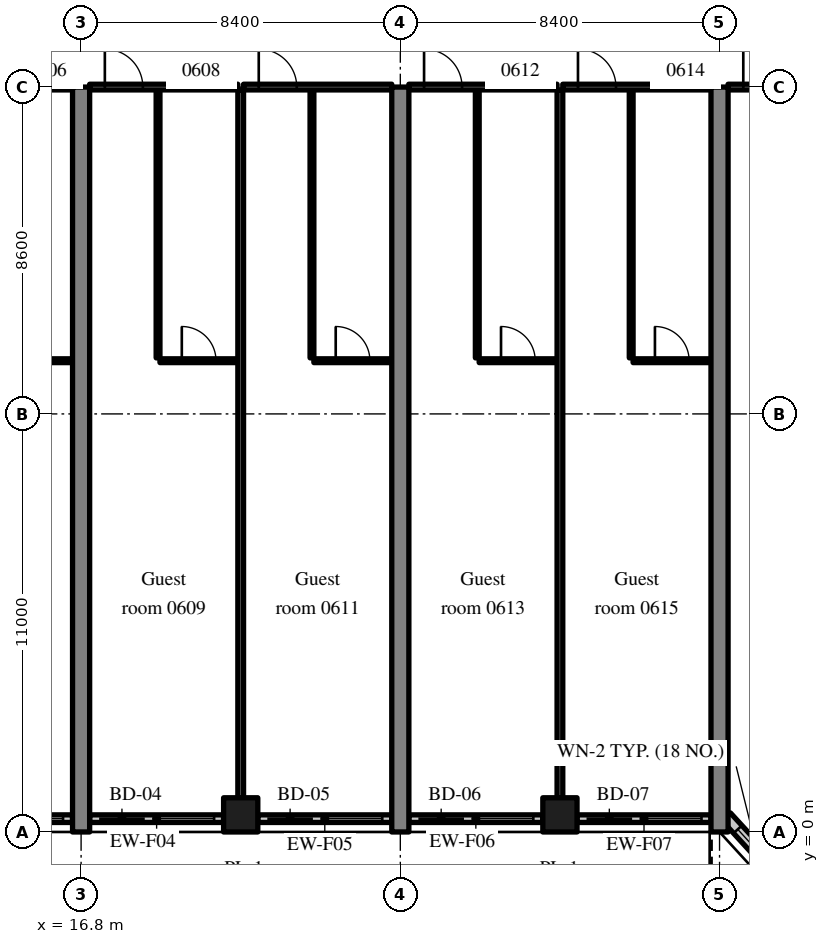
"""IFC4 building model, lengths in metres.
Left out: names, types, materials, properties, quantities, classifications, styles, units other than length and angle.
Written with IfcOpenShell. Run it as: python <this file> out.ifc"""

import sys

from ifc_helpers import new_model, si_unit, direction, frame, frame_2d, origin, origin_2d, place, context, subcontext, project, spatial, rectangle, extrude, source, transform, mapped, element, fill, save


model = new_model("IFC4")
c1 = context("Model", 3, precision=1e-05, world=origin(), true_north=direction((0.0, 1.0)))
c2 = subcontext(c1, "Body", "Model", "MODEL_VIEW")
j1 = project(units=[si_unit("LENGTHUNIT", "METRE"), si_unit("PLANEANGLEUNIT", "RADIAN")], contexts=[c1])
p1 = place(None, origin())
s1 = spatial("IfcSite", under=j1, at=p1, CompositionType="ELEMENT")
p2 = place(p1, origin())
s2 = spatial("IfcBuilding", under=s1, at=p2, CompositionType="ELEMENT")
p3 = place(p2, frame((0.0, 0.0, 31.6)))
s3 = spatial("IfcBuildingStorey", under=s2, at=p3, CompositionType="ELEMENT", Elevation=31.6)
m1 = source(origin(), c2, "Body", "SweptSolid", [
    extrude(rectangle(XDim=19.6, YDim=0.45, at=frame_2d((9.8, 0.0))), origin(), (0.0, 0.0, 1.0), 3.52),
])
for number, where, z_axis, x_axis in (
    (1, (16.8, 0.0, 0.0), (0.0, 0.0, 1.0), (0.0, 1.0, 0.0)),
    (2, (25.2, 0.0, 0.0), (0.0, 0.0, 1.0), (0.0, 1.0, 0.0)),
    (3, (33.6, 0.0, 0.0), (0.0, 0.0, 1.0), (0.0, 1.0, 0.0)),
):
    element("IfcWall", number, at=place(p3, frame(where, z_axis=z_axis, x_axis=x_axis)), inside=s3, PredefinedType="SHEAR", context=c2, shape_type="MappedRepresentation", body=[
        mapped(m1, transform((0.0, 0.0, 0.0), scale=1.0)),
    ])
m2 = source(origin(), c2, "Body", "SweptSolid", [
    extrude(rectangle(XDim=0.9, YDim=0.9, at=origin_2d()), origin(), (0.0, 0.0, 1.0), 3.52),
])
for number, where, z_axis, x_axis in (
    (4, (21.0, 0.45, 0.0), (0.0, 0.0, 1.0), (1.0, 0.0, 0.0)),
    (5, (29.4, 0.45, 0.0), (0.0, 0.0, 1.0), (1.0, 0.0, 0.0)),
):
    element("IfcColumn", number, at=place(p3, frame(where, z_axis=z_axis, x_axis=x_axis)), inside=s3, PredefinedType="COLUMN", context=c2, shape_type="MappedRepresentation", body=[
        mapped(m2, transform((0.0, 0.0, 0.0), scale=1.0)),
    ])
m3 = source(origin(), c2, "Body", "SweptSolid", [
    extrude(rectangle(XDim=3.525, YDim=0.2, at=frame_2d((1.762, 0.0))), origin(), (0.0, 0.0, 1.0), 2.77),
])
p4 = place(p3, frame((13.05, 0.35, 0.0), z_axis=(0.0, 0.0, 1.0), x_axis=(1.0, 0.0, 0.0)))
e6 = element("IfcWall", 6, at=p4, inside=s3, PredefinedType="SOLIDWALL", context=c2, shape_type="MappedRepresentation", body=[
    mapped(m3, transform((0.0, 0.0, 0.0), scale=1.0)),
])
m4 = source(origin(), c2, "Body", "SweptSolid", [
    extrude(rectangle(XDim=1.2, YDim=2.4, at=frame_2d((0.6, 1.2))), frame((0.0, 0.11, 0.0), z_axis=(0.0, -1.0, 0.0), x_axis=(1.0, 0.0, 0.0)), (0.0, 0.0, 1.0), 0.22),
])
p5 = place(p4, frame((0.25, 0.0, 0.0)))
e7 = element("IfcOpeningElement", 7, at=p5, cuts=e6, PredefinedType="OPENING", context=c2, shape_type="MappedRepresentation", body=[
    mapped(m4, transform((0.0, 0.0, 0.0), scale=1.0)),
])
m5 = source(origin(), c2, "Body", "SweptSolid", [
    extrude(rectangle(XDim=1.5, YDim=1.5, at=frame_2d((0.75, 0.75))), frame((0.0, 0.11, 0.0), z_axis=(0.0, -1.0, 0.0), x_axis=(1.0, 0.0, 0.0)), (0.0, 0.0, 1.0), 0.22),
])
p6 = place(p4, frame((1.775, 0.0, 0.9)))
e8 = element("IfcOpeningElement", 8, at=p6, cuts=e6, PredefinedType="OPENING", context=c2, shape_type="MappedRepresentation", body=[
    mapped(m5, transform((0.0, 0.0, 0.0), scale=1.0)),
])
m6 = source(origin(), c2, "Body", "SweptSolid", [
    extrude(rectangle(XDim=3.525, YDim=0.2, at=frame_2d((1.763, 0.0))), origin(), (0.0, 0.0, 1.0), 2.77),
])
p7 = place(p3, frame((17.025, 0.35, 0.0), z_axis=(0.0, 0.0, 1.0), x_axis=(1.0, 0.0, 0.0)))
e9 = element("IfcWall", 9, at=p7, inside=s3, PredefinedType="SOLIDWALL", context=c2, shape_type="MappedRepresentation", body=[
    mapped(m6, transform((0.0, 0.0, 0.0), scale=1.0)),
])
p8 = place(p7, frame((0.25, 0.0, 0.0)))
e10 = element("IfcOpeningElement", 10, at=p8, cuts=e9, PredefinedType="OPENING", context=c2, shape_type="MappedRepresentation", body=[
    mapped(m4, transform((0.0, 0.0, 0.0), scale=1.0)),
])
p9 = place(p7, frame((1.775, 0.0, 0.9)))
e11 = element("IfcOpeningElement", 11, at=p9, cuts=e9, PredefinedType="OPENING", context=c2, shape_type="MappedRepresentation", body=[
    mapped(m5, transform((0.0, 0.0, 0.0), scale=1.0)),
])
p10 = place(p3, frame((21.45, 0.35, 0.0), z_axis=(0.0, 0.0, 1.0), x_axis=(1.0, 0.0, 0.0)))
e12 = element("IfcWall", 12, at=p10, inside=s3, PredefinedType="SOLIDWALL", context=c2, shape_type="MappedRepresentation", body=[
    mapped(m6, transform((0.0, 0.0, 0.0), scale=1.0)),
])
p11 = place(p10, frame((0.25, 0.0, 0.0)))
e13 = element("IfcOpeningElement", 13, at=p11, cuts=e12, PredefinedType="OPENING", context=c2, shape_type="MappedRepresentation", body=[
    mapped(m4, transform((0.0, 0.0, 0.0), scale=1.0)),
])
p12 = place(p10, frame((1.775, 0.0, 0.9)))
e14 = element("IfcOpeningElement", 14, at=p12, cuts=e12, PredefinedType="OPENING", context=c2, shape_type="MappedRepresentation", body=[
    mapped(m5, transform((0.0, 0.0, 0.0), scale=1.0)),
])
p13 = place(p3, frame((25.425, 0.35, 0.0), z_axis=(0.0, 0.0, 1.0), x_axis=(1.0, 0.0, 0.0)))
e15 = element("IfcWall", 15, at=p13, inside=s3, PredefinedType="SOLIDWALL", context=c2, shape_type="MappedRepresentation", body=[
    mapped(m3, transform((0.0, 0.0, 0.0), scale=1.0)),
])
p14 = place(p13, frame((0.25, 0.0, 0.0)))
e16 = element("IfcOpeningElement", 16, at=p14, cuts=e15, PredefinedType="OPENING", context=c2, shape_type="MappedRepresentation", body=[
    mapped(m4, transform((0.0, 0.0, 0.0), scale=1.0)),
])
p15 = place(p13, frame((1.775, 0.0, 0.9)))
e17 = element("IfcOpeningElement", 17, at=p15, cuts=e15, PredefinedType="OPENING", context=c2, shape_type="MappedRepresentation", body=[
    mapped(m5, transform((0.0, 0.0, 0.0), scale=1.0)),
])
p16 = place(p3, frame((29.85, 0.35, 0.0), z_axis=(0.0, 0.0, 1.0), x_axis=(1.0, 0.0, 0.0)))
e18 = element("IfcWall", 18, at=p16, inside=s3, PredefinedType="SOLIDWALL", context=c2, shape_type="MappedRepresentation", body=[
    mapped(m3, transform((0.0, 0.0, 0.0), scale=1.0)),
])
p17 = place(p16, frame((0.25, 0.0, 0.0)))
e19 = element("IfcOpeningElement", 19, at=p17, cuts=e18, PredefinedType="OPENING", context=c2, shape_type="MappedRepresentation", body=[
    mapped(m4, transform((0.0, 0.0, 0.0), scale=1.0)),
])
p18 = place(p16, frame((1.775, 0.0, 0.9)))
e20 = element("IfcOpeningElement", 20, at=p18, cuts=e18, PredefinedType="OPENING", context=c2, shape_type="MappedRepresentation", body=[
    mapped(m5, transform((0.0, 0.0, 0.0), scale=1.0)),
])
m7 = source(origin(), c2, "Body", "SweptSolid", [
    extrude(rectangle(XDim=2.398, YDim=0.3, at=frame_2d((1.199, 0.0))), origin(), (0.0, 0.0, 1.0), 3.52),
])
p19 = place(p3, frame((33.776, 0.4, 0.0), z_axis=(0.0, 0.0, 1.0), x_axis=(0.675374189419, -0.737475222815, 0.0)))
e21 = element("IfcWall", 21, at=p19, inside=s3, PredefinedType="SOLIDWALL", context=c2, shape_type="MappedRepresentation", body=[
    mapped(m7, transform((0.0, 0.0, 0.0), scale=1.0)),
])
m8 = source(origin(), c2, "Body", "SweptSolid", [
    extrude(rectangle(XDim=1.5, YDim=2.0, at=frame_2d((0.75, 1.0))), frame((0.0, 0.16, 0.0), z_axis=(0.0, -1.0, 0.0), x_axis=(1.0, 0.0, 0.0)), (0.0, 0.0, 1.0), 0.32),
])
p20 = place(p19, frame((0.449, 0.0, 0.9)))
e22 = element("IfcOpeningElement", 22, at=p20, cuts=e21, PredefinedType="OPENING", context=c2, shape_type="MappedRepresentation", body=[
    mapped(m8, transform((0.0, 0.0, 0.0), scale=1.0)),
])
m9 = source(origin(), c2, "Body", "SweptSolid", [
    extrude(rectangle(XDim=2.05, YDim=0.1, at=frame_2d((1.025, 0.0))), origin(), (0.0, 0.0, 1.0), 3.52),
])
p21 = place(p3, frame((14.525, 12.4, 0.0), z_axis=(0.0, 0.0, 1.0), x_axis=(1.0, 0.0, 0.0)))
e23 = element("IfcWall", 23, at=p21, inside=s3, PredefinedType="PARTITIONING", context=c2, shape_type="MappedRepresentation", body=[
    mapped(m9, transform((0.0, 0.0, 0.0), scale=1.0)),
])
m10 = source(origin(), c2, "Body", "SweptSolid", [
    extrude(rectangle(XDim=0.9, YDim=2.1, at=frame_2d((0.45, 1.05))), frame((0.0, 0.06, 0.0), z_axis=(0.0, -1.0, 0.0), x_axis=(1.0, 0.0, 0.0)), (0.0, 0.0, 1.0), 0.12),
])
p22 = place(p21, frame((0.575, 0.0, 0.0)))
e24 = element("IfcOpeningElement", 24, at=p22, cuts=e23, PredefinedType="OPENING", context=c2, shape_type="MappedRepresentation", body=[
    mapped(m10, transform((0.0, 0.0, 0.0), scale=1.0)),
])
m11 = source(origin(), c2, "Body", "SweptSolid", [
    extrude(rectangle(XDim=3.9, YDim=0.15, at=frame_2d((1.95, 0.0))), origin(), (0.0, 0.0, 1.0), 2.82),
])
p23 = place(p3, frame((12.675, 19.6, 0.0), z_axis=(0.0, 0.0, 1.0), x_axis=(1.0, 0.0, 0.0)))
e25 = element("IfcWall", 25, at=p23, inside=s3, PredefinedType="PARTITIONING", context=c2, shape_type="MappedRepresentation", body=[
    mapped(m11, transform((0.0, 0.0, 0.0), scale=1.0)),
])
m12 = source(origin(), c2, "Body", "SweptSolid", [
    extrude(rectangle(XDim=1.0, YDim=2.1, at=frame_2d((0.5, 1.05))), frame((0.0, 0.085, 0.0), z_axis=(0.0, -1.0, 0.0), x_axis=(1.0, 0.0, 0.0)), (0.0, 0.0, 1.0), 0.17),
])
p24 = place(p23, frame((0.4, 0.0, 0.0)))
e26 = element("IfcOpeningElement", 26, at=p24, cuts=e25, PredefinedType="OPENING", context=c2, shape_type="MappedRepresentation", body=[
    mapped(m12, transform((0.0, 0.0, 0.0), scale=1.0)),
])
m13 = source(origin(), c2, "Body", "SweptSolid", [
    extrude(rectangle(XDim=7.05, YDim=0.1, at=frame_2d((3.525, 0.0))), origin(), (0.0, 0.0, 1.0), 3.52),
])
p25 = place(p3, frame((18.825, 12.475, 0.0), z_axis=(0.0, 0.0, 1.0), x_axis=(0.0, 1.0, 0.0)))
e27 = element("IfcWall", 27, at=p25, inside=s3, PredefinedType="PARTITIONING", context=c2, shape_type="MappedRepresentation", body=[
    mapped(m13, transform((0.0, 0.0, 0.0), scale=1.0)),
])
p26 = place(p3, frame((18.875, 12.4, 0.0), z_axis=(0.0, 0.0, 1.0), x_axis=(1.0, 0.0, 0.0)))
e28 = element("IfcWall", 28, at=p26, inside=s3, PredefinedType="PARTITIONING", context=c2, shape_type="MappedRepresentation", body=[
    mapped(m9, transform((0.0, 0.0, 0.0), scale=1.0)),
])
p27 = place(p26, frame((0.575, 0.0, 0.0)))
e29 = element("IfcOpeningElement", 29, at=p27, cuts=e28, PredefinedType="OPENING", context=c2, shape_type="MappedRepresentation", body=[
    mapped(m10, transform((0.0, 0.0, 0.0), scale=1.0)),
])
m14 = source(origin(), c2, "Body", "SweptSolid", [
    extrude(rectangle(XDim=3.9, YDim=0.15, at=frame_2d((1.95, 0.0))), origin(), (0.0, 0.0, 1.0), 2.82),
])
p28 = place(p3, frame((17.025, 19.6, 0.0), z_axis=(0.0, 0.0, 1.0), x_axis=(1.0, 0.0, 0.0)))
e30 = element("IfcWall", 30, at=p28, inside=s3, PredefinedType="PARTITIONING", context=c2, shape_type="MappedRepresentation", body=[
    mapped(m14, transform((0.0, 0.0, 0.0), scale=1.0)),
])
p29 = place(p28, frame((0.4, 0.0, 0.0)))
e31 = element("IfcOpeningElement", 31, at=p29, cuts=e30, PredefinedType="OPENING", context=c2, shape_type="MappedRepresentation", body=[
    mapped(m12, transform((0.0, 0.0, 0.0), scale=1.0)),
])
p30 = place(p3, frame((22.875, 12.475, 0.0), z_axis=(0.0, 0.0, 1.0), x_axis=(0.0, 1.0, 0.0)))
e32 = element("IfcWall", 32, at=p30, inside=s3, PredefinedType="PARTITIONING", context=c2, shape_type="MappedRepresentation", body=[
    mapped(m13, transform((0.0, 0.0, 0.0), scale=1.0)),
])
p31 = place(p3, frame((22.925, 12.4, 0.0), z_axis=(0.0, 0.0, 1.0), x_axis=(1.0, 0.0, 0.0)))
e33 = element("IfcWall", 33, at=p31, inside=s3, PredefinedType="PARTITIONING", context=c2, shape_type="MappedRepresentation", body=[
    mapped(m9, transform((0.0, 0.0, 0.0), scale=1.0)),
])
p32 = place(p31, frame((0.575, 0.0, 0.0)))
e34 = element("IfcOpeningElement", 34, at=p32, cuts=e33, PredefinedType="OPENING", context=c2, shape_type="MappedRepresentation", body=[
    mapped(m10, transform((0.0, 0.0, 0.0), scale=1.0)),
])
p33 = place(p3, frame((21.075, 19.6, 0.0), z_axis=(0.0, 0.0, 1.0), x_axis=(1.0, 0.0, 0.0)))
e35 = element("IfcWall", 35, at=p33, inside=s3, PredefinedType="PARTITIONING", context=c2, shape_type="MappedRepresentation", body=[
    mapped(m14, transform((0.0, 0.0, 0.0), scale=1.0)),
])
p34 = place(p33, frame((0.4, 0.0, 0.0)))
e36 = element("IfcOpeningElement", 36, at=p34, cuts=e35, PredefinedType="OPENING", context=c2, shape_type="MappedRepresentation", body=[
    mapped(m12, transform((0.0, 0.0, 0.0), scale=1.0)),
])
m15 = source(origin(), c2, "Body", "SweptSolid", [
    extrude(rectangle(XDim=18.625, YDim=0.15, at=frame_2d((9.312, 0.0))), origin(), (0.0, 0.0, 1.0), 3.52),
])
p35 = place(p3, frame((21.0, 0.9, 0.0), z_axis=(0.0, 0.0, 1.0), x_axis=(0.0, 1.0, 0.0)))
e37 = element("IfcWall", 37, at=p35, inside=s3, PredefinedType="PARTITIONING", context=c2, shape_type="MappedRepresentation", body=[
    mapped(m15, transform((0.0, 0.0, 0.0), scale=1.0)),
])
p36 = place(p3, frame((27.225, 12.475, 0.0), z_axis=(0.0, 0.0, 1.0), x_axis=(0.0, 1.0, 0.0)))
e38 = element("IfcWall", 38, at=p36, inside=s3, PredefinedType="PARTITIONING", context=c2, shape_type="MappedRepresentation", body=[
    mapped(m13, transform((0.0, 0.0, 0.0), scale=1.0)),
])
p37 = place(p3, frame((27.275, 12.4, 0.0), z_axis=(0.0, 0.0, 1.0), x_axis=(1.0, 0.0, 0.0)))
e39 = element("IfcWall", 39, at=p37, inside=s3, PredefinedType="PARTITIONING", context=c2, shape_type="MappedRepresentation", body=[
    mapped(m9, transform((0.0, 0.0, 0.0), scale=1.0)),
])
p38 = place(p37, frame((0.575, 0.0, 0.0)))
e40 = element("IfcOpeningElement", 40, at=p38, cuts=e39, PredefinedType="OPENING", context=c2, shape_type="MappedRepresentation", body=[
    mapped(m10, transform((0.0, 0.0, 0.0), scale=1.0)),
])
p39 = place(p3, frame((25.425, 19.6, 0.0), z_axis=(0.0, 0.0, 1.0), x_axis=(1.0, 0.0, 0.0)))
e41 = element("IfcWall", 41, at=p39, inside=s3, PredefinedType="PARTITIONING", context=c2, shape_type="MappedRepresentation", body=[
    mapped(m11, transform((0.0, 0.0, 0.0), scale=1.0)),
])
p40 = place(p39, frame((0.4, 0.0, 0.0)))
e42 = element("IfcOpeningElement", 42, at=p40, cuts=e41, PredefinedType="OPENING", context=c2, shape_type="MappedRepresentation", body=[
    mapped(m12, transform((0.0, 0.0, 0.0), scale=1.0)),
])
p41 = place(p3, frame((31.275, 12.475, 0.0), z_axis=(0.0, 0.0, 1.0), x_axis=(0.0, 1.0, 0.0)))
e43 = element("IfcWall", 43, at=p41, inside=s3, PredefinedType="PARTITIONING", context=c2, shape_type="MappedRepresentation", body=[
    mapped(m13, transform((0.0, 0.0, 0.0), scale=1.0)),
])
p42 = place(p3, frame((31.325, 12.4, 0.0), z_axis=(0.0, 0.0, 1.0), x_axis=(1.0, 0.0, 0.0)))
e44 = element("IfcWall", 44, at=p42, inside=s3, PredefinedType="PARTITIONING", context=c2, shape_type="MappedRepresentation", body=[
    mapped(m9, transform((0.0, 0.0, 0.0), scale=1.0)),
])
p43 = place(p42, frame((0.575, 0.0, 0.0)))
e45 = element("IfcOpeningElement", 45, at=p43, cuts=e44, PredefinedType="OPENING", context=c2, shape_type="MappedRepresentation", body=[
    mapped(m10, transform((0.0, 0.0, 0.0), scale=1.0)),
])
p44 = place(p3, frame((29.475, 19.6, 0.0), z_axis=(0.0, 0.0, 1.0), x_axis=(1.0, 0.0, 0.0)))
e46 = element("IfcWall", 46, at=p44, inside=s3, PredefinedType="PARTITIONING", context=c2, shape_type="MappedRepresentation", body=[
    mapped(m11, transform((0.0, 0.0, 0.0), scale=1.0)),
])
p45 = place(p44, frame((0.4, 0.0, 0.0)))
e47 = element("IfcOpeningElement", 47, at=p45, cuts=e46, PredefinedType="OPENING", context=c2, shape_type="MappedRepresentation", body=[
    mapped(m12, transform((0.0, 0.0, 0.0), scale=1.0)),
])
p46 = place(p3, frame((29.4, 0.9, 0.0), z_axis=(0.0, 0.0, 1.0), x_axis=(0.0, 1.0, 0.0)))
e48 = element("IfcWall", 48, at=p46, inside=s3, PredefinedType="PARTITIONING", context=c2, shape_type="MappedRepresentation", body=[
    mapped(m15, transform((0.0, 0.0, 0.0), scale=1.0)),
])
p47 = place(p3, frame((33.825, 19.6, 0.0), z_axis=(0.0, 0.0, 1.0), x_axis=(1.0, 0.0, 0.0)))
e49 = element("IfcWall", 49, at=p47, inside=s3, PredefinedType="PARTITIONING", context=c2, shape_type="MappedRepresentation", body=[
    mapped(m14, transform((0.0, 0.0, 0.0), scale=1.0)),
])
p48 = place(p47, frame((0.4, 0.0, 0.0)))
e50 = element("IfcOpeningElement", 50, at=p48, cuts=e49, PredefinedType="OPENING", context=c2, shape_type="MappedRepresentation", body=[
    mapped(m12, transform((0.0, 0.0, 0.0), scale=1.0)),
])
m16 = source(origin(), c2, "Body", "SweptSolid", [
    extrude(rectangle(XDim=1.5, YDim=1.5, at=frame_2d((0.75, 0.75))), frame((0.0, 0.03, 0.0), z_axis=(0.0, -1.0, 0.0), x_axis=(1.0, 0.0, 0.0)), (0.0, 0.0, 1.0), 0.06),
])
p49 = place(p6, origin())
e51 = element("IfcWindow", 51, at=p49, inside=s3, PartitioningType="SINGLE_PANEL", PredefinedType="WINDOW", context=c2, shape_type="MappedRepresentation", body=[
    mapped(m16, transform((0.0, 0.0, 0.0), scale=1.0)),
])
fill(e8, e51)
m17 = source(origin(), c2, "Body", "SweptSolid", [
    extrude(rectangle(XDim=1.2, YDim=2.4, at=frame_2d((0.6, 1.2))), frame((0.0, 0.025, 0.0), z_axis=(0.0, -1.0, 0.0), x_axis=(1.0, 0.0, 0.0)), (0.0, 0.0, 1.0), 0.05),
])
p50 = place(p8, origin())
e52 = element("IfcDoor", 52, at=p50, inside=s3, OperationType="SLIDING_TO_RIGHT", PredefinedType="DOOR", context=c2, shape_type="MappedRepresentation", body=[
    mapped(m17, transform((0.0, 0.0, 0.0), scale=1.0)),
])
fill(e10, e52)
p51 = place(p9, origin())
e53 = element("IfcWindow", 53, at=p51, inside=s3, PartitioningType="SINGLE_PANEL", PredefinedType="WINDOW", context=c2, shape_type="MappedRepresentation", body=[
    mapped(m16, transform((0.0, 0.0, 0.0), scale=1.0)),
])
fill(e11, e53)
p52 = place(p11, origin())
e54 = element("IfcDoor", 54, at=p52, inside=s3, OperationType="SLIDING_TO_LEFT", PredefinedType="DOOR", context=c2, shape_type="MappedRepresentation", body=[
    mapped(m17, transform((0.0, 0.0, 0.0), scale=1.0)),
])
fill(e13, e54)
p53 = place(p12, origin())
e55 = element("IfcWindow", 55, at=p53, inside=s3, PartitioningType="SINGLE_PANEL", PredefinedType="WINDOW", context=c2, shape_type="MappedRepresentation", body=[
    mapped(m16, transform((0.0, 0.0, 0.0), scale=1.0)),
])
fill(e14, e55)
p54 = place(p14, origin())
e56 = element("IfcDoor", 56, at=p54, inside=s3, OperationType="SLIDING_TO_RIGHT", PredefinedType="DOOR", context=c2, shape_type="MappedRepresentation", body=[
    mapped(m17, transform((0.0, 0.0, 0.0), scale=1.0)),
])
fill(e16, e56)
p55 = place(p15, origin())
e57 = element("IfcWindow", 57, at=p55, inside=s3, PartitioningType="SINGLE_PANEL", PredefinedType="WINDOW", context=c2, shape_type="MappedRepresentation", body=[
    mapped(m16, transform((0.0, 0.0, 0.0), scale=1.0)),
])
fill(e17, e57)
p56 = place(p17, origin())
e58 = element("IfcDoor", 58, at=p56, inside=s3, OperationType="SLIDING_TO_LEFT", PredefinedType="DOOR", context=c2, shape_type="MappedRepresentation", body=[
    mapped(m17, transform((0.0, 0.0, 0.0), scale=1.0)),
])
fill(e19, e58)
p57 = place(p18, origin())
e59 = element("IfcWindow", 59, at=p57, inside=s3, PartitioningType="SINGLE_PANEL", PredefinedType="WINDOW", context=c2, shape_type="MappedRepresentation", body=[
    mapped(m16, transform((0.0, 0.0, 0.0), scale=1.0)),
])
fill(e20, e59)
m18 = source(origin(), c2, "Body", "SweptSolid", [
    extrude(rectangle(XDim=1.5, YDim=2.0, at=frame_2d((0.75, 1.0))), frame((0.0, 0.03, 0.0), z_axis=(0.0, -1.0, 0.0), x_axis=(1.0, 0.0, 0.0)), (0.0, 0.0, 1.0), 0.06),
])
p58 = place(p20, origin())
e60 = element("IfcWindow", 60, at=p58, inside=s3, PartitioningType="SINGLE_PANEL", PredefinedType="WINDOW", context=c2, shape_type="MappedRepresentation", body=[
    mapped(m18, transform((0.0, 0.0, 0.0), scale=1.0)),
])
fill(e22, e60)
m19 = source(origin(), c2, "Body", "SweptSolid", [
    extrude(rectangle(XDim=0.9, YDim=2.1, at=frame_2d((0.45, 1.05))), frame((0.0, 0.025, 0.0), z_axis=(0.0, -1.0, 0.0), x_axis=(1.0, 0.0, 0.0)), (0.0, 0.0, 1.0), 0.05),
])
p59 = place(p27, origin())
e61 = element("IfcDoor", 61, at=p59, inside=s3, OperationType="SINGLE_SWING_LEFT", PredefinedType="DOOR", context=c2, shape_type="MappedRepresentation", body=[
    mapped(m19, transform((0.0, 0.0, 0.0), scale=1.0)),
])
fill(e29, e61)
m20 = source(origin(), c2, "Body", "SweptSolid", [
    extrude(rectangle(XDim=1.0, YDim=2.1, at=frame_2d((0.5, 1.05))), frame((0.0, 0.025, 0.0), z_axis=(0.0, -1.0, 0.0), x_axis=(1.0, 0.0, 0.0)), (0.0, 0.0, 1.0), 0.05),
])
p60 = place(p29, origin())
e62 = element("IfcDoor", 62, at=p60, inside=s3, OperationType="SINGLE_SWING_LEFT", PredefinedType="DOOR", context=c2, shape_type="MappedRepresentation", body=[
    mapped(m20, transform((0.0, 0.0, 0.0), scale=1.0)),
])
fill(e31, e62)
p61 = place(p32, origin())
e63 = element("IfcDoor", 63, at=p61, inside=s3, OperationType="SINGLE_SWING_LEFT", PredefinedType="DOOR", context=c2, shape_type="MappedRepresentation", body=[
    mapped(m19, transform((0.0, 0.0, 0.0), scale=1.0)),
])
fill(e34, e63)
p62 = place(p34, origin())
e64 = element("IfcDoor", 64, at=p62, inside=s3, OperationType="SINGLE_SWING_LEFT", PredefinedType="DOOR", context=c2, shape_type="MappedRepresentation", body=[
    mapped(m20, transform((0.0, 0.0, 0.0), scale=1.0)),
])
fill(e36, e64)
p63 = place(p38, origin())
e65 = element("IfcDoor", 65, at=p63, inside=s3, OperationType="SINGLE_SWING_LEFT", PredefinedType="DOOR", context=c2, shape_type="MappedRepresentation", body=[
    mapped(m19, transform((0.0, 0.0, 0.0), scale=1.0)),
])
fill(e40, e65)
p64 = place(p40, origin())
e66 = element("IfcDoor", 66, at=p64, inside=s3, OperationType="SINGLE_SWING_LEFT", PredefinedType="DOOR", context=c2, shape_type="MappedRepresentation", body=[
    mapped(m20, transform((0.0, 0.0, 0.0), scale=1.0)),
])
fill(e42, e66)
p65 = place(p43, origin())
e67 = element("IfcDoor", 67, at=p65, inside=s3, OperationType="SINGLE_SWING_LEFT", PredefinedType="DOOR", context=c2, shape_type="MappedRepresentation", body=[
    mapped(m19, transform((0.0, 0.0, 0.0), scale=1.0)),
])
fill(e45, e67)
p66 = place(p45, origin())
e68 = element("IfcDoor", 68, at=p66, inside=s3, OperationType="SINGLE_SWING_LEFT", PredefinedType="DOOR", context=c2, shape_type="MappedRepresentation", body=[
    mapped(m20, transform((0.0, 0.0, 0.0), scale=1.0)),
])
fill(e47, e68)
p67 = place(p48, origin())
e69 = element("IfcDoor", 69, at=p67, inside=s3, OperationType="SINGLE_SWING_LEFT", PredefinedType="DOOR", context=c2, shape_type="MappedRepresentation", body=[
    mapped(m20, transform((0.0, 0.0, 0.0), scale=1.0)),
])
fill(e50, e69)
save(model, sys.argv[1])
